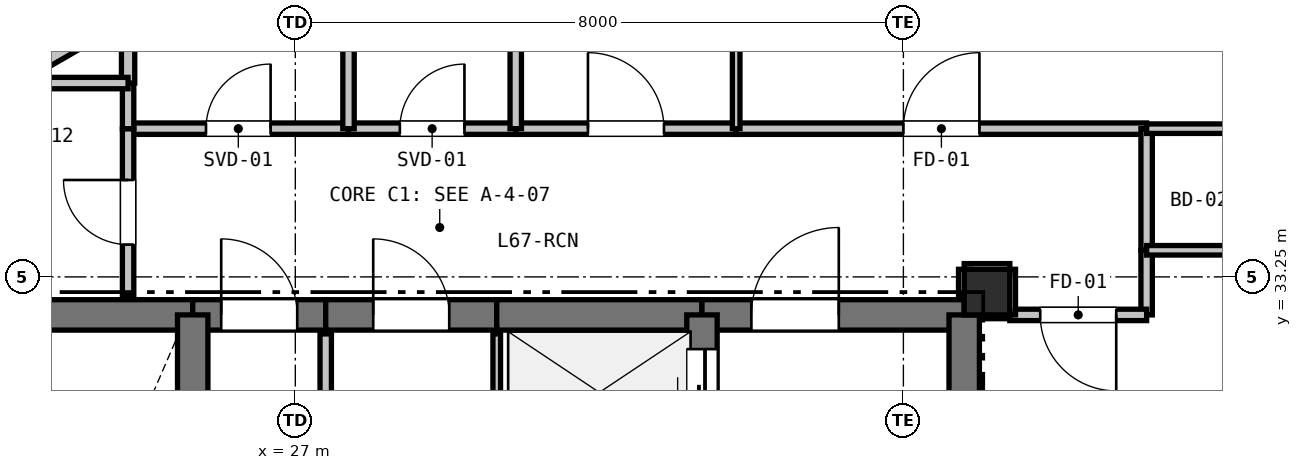
"""IFC4 building model, lengths in metres.
Left out: names, types, materials, properties, quantities, classifications, styles, units other than length and angle.
Written with IfcOpenShell. Run it as: python <this file> out.ifc"""

import sys

from ifc_helpers import new_model, si_unit, direction, frame, frame_2d, origin, origin_2d, place, context, subcontext, project, spatial, rectangle, extrude, element, fill, save


model = new_model("IFC4")
c1 = context("Model", 3, precision=1e-05, world=origin(), true_north=direction((0.0, 1.0)))
c2 = subcontext(c1, "Body", "Model", "MODEL_VIEW")
j1 = project(units=[si_unit("LENGTHUNIT", "METRE"), si_unit("PLANEANGLEUNIT", "RADIAN")], contexts=[c1])
p1 = place(None, origin())
s1 = spatial("IfcSite", under=j1, at=p1, CompositionType="ELEMENT")
p2 = place(p1, origin())
s2 = spatial("IfcBuilding", under=s1, at=p2, CompositionType="ELEMENT")
p3 = place(p2, frame((0.0, 0.0, 239.7)))
s3 = spatial("IfcBuildingStorey", under=s2, at=p3, CompositionType="ELEMENT", Elevation=239.7)
p4 = place(p3, frame((36.1, 33.05, 0.0), z_axis=(0.0, 0.0, 1.0), x_axis=(1.0, 0.0, 0.0)))
e1 = element("IfcColumn", 1, at=p4, inside=s3, PredefinedType="COLUMN", context=c2, shape_type="SweptSolid", body=[
    extrude(rectangle(XDim=0.6, YDim=0.6, at=origin_2d()), origin(), (0.0, 0.0, 1.0), 3.3),
])
p5 = place(p3, frame((20.066, 33.997, 0.0), z_axis=(0.0, 0.0, 1.0), x_axis=(0.866019557082, 0.500010126649, 0.0)))
e2 = element("IfcWall", 2, at=p5, inside=s3, PredefinedType="PARAPET", context=c2, shape_type="SweptSolid", body=[
    extrude(rectangle(XDim=8.228, YDim=0.2, at=frame_2d((4.114, 0.0))), origin(), (0.0, 0.0, 1.0), 0.2),
])
p6 = place(p3, frame((22.2, 32.75, 0.0), z_axis=(0.0, 0.0, 1.0), x_axis=(1.0, 0.0, 0.0)))
e3 = element("IfcWall", 3, at=p6, inside=s3, PredefinedType="SHEAR", context=c2, shape_type="SweptSolid", body=[
    extrude(rectangle(XDim=3.45, YDim=0.4, at=frame_2d((1.725, 0.0))), origin(), (0.0, 0.0, 1.0), 3.08),
])
p7 = place(p3, frame((25.65, 32.75, 0.0), z_axis=(0.0, 0.0, 1.0), x_axis=(1.0, 0.0, 0.0)))
e4 = element("IfcWall", 4, at=p7, inside=s3, PredefinedType="SHEAR", context=c2, shape_type="SweptSolid", body=[
    extrude(rectangle(XDim=1.75, YDim=0.4, at=frame_2d((0.875, 0.0))), origin(), (0.0, 0.0, 1.0), 3.08),
])
p8 = place(p7, frame((0.375, 0.0, 0.0)))
e5 = element("IfcOpeningElement", 5, at=p8, cuts=e4, PredefinedType="OPENING", context=c2, shape_type="SweptSolid", body=[
    extrude(rectangle(XDim=1.0, YDim=2.15, at=frame_2d((0.5, 1.075))), frame((0.0, 0.21, 0.0), z_axis=(0.0, -1.0, 0.0), x_axis=(1.0, 0.0, 0.0)), (0.0, 0.0, 1.0), 0.42),
])
p9 = place(p3, frame((27.4, 32.75, 0.0), z_axis=(0.0, 0.0, 1.0), x_axis=(1.0, 0.0, 0.0)))
e6 = element("IfcWall", 6, at=p9, inside=s3, PredefinedType="SHEAR", context=c2, shape_type="SweptSolid", body=[
    extrude(rectangle(XDim=2.25, YDim=0.4, at=frame_2d((1.125, 0.0))), origin(), (0.0, 0.0, 1.0), 3.08),
])
p10 = place(p9, frame((0.625, 0.0, 0.0)))
e7 = element("IfcOpeningElement", 7, at=p10, cuts=e6, PredefinedType="OPENING", context=c2, shape_type="SweptSolid", body=[
    extrude(rectangle(XDim=1.0, YDim=2.15, at=frame_2d((0.5, 1.075))), frame((0.0, 0.21, 0.0), z_axis=(0.0, -1.0, 0.0), x_axis=(1.0, 0.0, 0.0)), (0.0, 0.0, 1.0), 0.42),
])
p11 = place(p3, frame((29.65, 32.75, 0.0), z_axis=(0.0, 0.0, 1.0), x_axis=(1.0, 0.0, 0.0)))
e8 = element("IfcWall", 8, at=p11, inside=s3, PredefinedType="SHEAR", context=c2, shape_type="SweptSolid", body=[
    extrude(rectangle(XDim=2.7, YDim=0.4, at=frame_2d((1.35, 0.0))), origin(), (0.0, 0.0, 1.0), 3.08),
])
p12 = place(p3, frame((32.35, 32.75, 0.0), z_axis=(0.0, 0.0, 1.0), x_axis=(1.0, 0.0, 0.0)))
e9 = element("IfcWall", 9, at=p12, inside=s3, PredefinedType="SHEAR", context=c2, shape_type="SweptSolid", body=[
    extrude(rectangle(XDim=3.45, YDim=0.4, at=frame_2d((1.725, 0.0))), origin(), (0.0, 0.0, 1.0), 3.08),
])
p13 = place(p12, frame((0.65, 0.0, 0.0)))
e10 = element("IfcOpeningElement", 10, at=p13, cuts=e9, PredefinedType="OPENING", context=c2, shape_type="SweptSolid", body=[
    extrude(rectangle(XDim=1.15, YDim=2.15, at=frame_2d((0.575, 1.075))), frame((0.0, 0.21, 0.0), z_axis=(0.0, -1.0, 0.0), x_axis=(1.0, 0.0, 0.0)), (0.0, 0.0, 1.0), 0.42),
])
p14 = place(p3, frame((35.8, 32.75, 0.0), z_axis=(0.0, 0.0, 1.0), x_axis=(0.0, -1.0, 0.0)))
e11 = element("IfcWall", 11, at=p14, inside=s3, PredefinedType="SHEAR", context=c2, shape_type="SweptSolid", body=[
    extrude(rectangle(XDim=4.65, YDim=0.4, at=frame_2d((2.325, 0.0))), origin(), (0.0, 0.0, 1.0), 3.08),
])
p15 = place(p3, frame((25.65, 27.95, 0.0), z_axis=(0.0, 0.0, 1.0), x_axis=(0.0, 1.0, 0.0)))
e12 = element("IfcWall", 12, at=p15, inside=s3, PredefinedType="SHEAR", context=c2, shape_type="SweptSolid", body=[
    extrude(rectangle(XDim=4.8, YDim=0.4, at=frame_2d((2.4, 0.0))), origin(), (0.0, 0.0, 1.0), 3.08),
])
p16 = place(p3, frame((32.35, 30.75, 0.0), z_axis=(0.0, 0.0, 1.0), x_axis=(0.0, 1.0, 0.0)))
e13 = element("IfcWall", 13, at=p16, inside=s3, PredefinedType="SHEAR", context=c2, shape_type="SweptSolid", body=[
    extrude(rectangle(XDim=2.0, YDim=0.4, at=frame_2d((1.0, 0.0))), origin(), (0.0, 0.0, 1.0), 3.08),
])
p17 = place(p16, frame((0.45, 0.0, 0.0)))
e14 = element("IfcOpeningElement", 14, at=p17, cuts=e13, PredefinedType="OPENING", context=c2, shape_type="SweptSolid", body=[
    extrude(rectangle(XDim=1.1, YDim=2.15, at=frame_2d((0.55, 1.075))), frame((0.0, 0.21, 0.0), z_axis=(0.0, -1.0, 0.0), x_axis=(1.0, 0.0, 0.0)), (0.0, 0.0, 1.0), 0.42),
])
p18 = place(p3, frame((29.65, 30.3, 0.0), z_axis=(0.0, 0.0, 1.0), x_axis=(0.0, 1.0, 0.0)))
e15 = element("IfcWall", 15, at=p18, inside=s3, PredefinedType="PARTITIONING", context=c2, shape_type="SweptSolid", body=[
    extrude(rectangle(XDim=2.2, YDim=0.1, at=frame_2d((1.1, 0.0))), origin(), (0.0, 0.0, 1.0), 3.08),
])
p19 = place(p3, frame((27.4, 32.5, 0.0), z_axis=(0.0, 0.0, 1.0), x_axis=(0.0, -1.0, 0.0)))
e16 = element("IfcWall", 16, at=p19, inside=s3, PredefinedType="PARTITIONING", context=c2, shape_type="SweptSolid", body=[
    extrude(rectangle(XDim=4.55, YDim=0.15, at=frame_2d((2.275, 0.0))), origin(), (0.0, 0.0, 1.0), 3.08),
])
p20 = place(p19, frame((1.775, 0.0, 0.0)))
e17 = element("IfcOpeningElement", 17, at=p20, cuts=e16, PredefinedType="OPENING", context=c2, shape_type="SweptSolid", body=[
    extrude(rectangle(XDim=1.0, YDim=2.15, at=frame_2d((0.5, 1.075))), frame((0.0, 0.085, 0.0), z_axis=(0.0, -1.0, 0.0), x_axis=(1.0, 0.0, 0.0)), (0.0, 0.0, 1.0), 0.17),
])
p21 = place(p3, frame((24.8, 35.2, 0.0), z_axis=(0.0, 0.0, 1.0), x_axis=(1.0, 0.0, 0.0)))
e18 = element("IfcWall", 18, at=p21, inside=s3, PredefinedType="PARTITIONING", context=c2, shape_type="SweptSolid", body=[
    extrude(rectangle(XDim=2.9, YDim=0.15, at=frame_2d((1.45, 0.0))), origin(), (0.0, 0.0, 1.0), 3.08),
])
p22 = place(p21, frame((1.025, 0.0, 0.0)))
e19 = element("IfcOpeningElement", 19, at=p22, cuts=e18, PredefinedType="OPENING", context=c2, shape_type="SweptSolid", body=[
    extrude(rectangle(XDim=0.85, YDim=2.1, at=frame_2d((0.425, 1.05))), frame((0.0, 0.085, 0.0), z_axis=(0.0, -1.0, 0.0), x_axis=(1.0, 0.0, 0.0)), (0.0, 0.0, 1.0), 0.17),
])
p23 = place(p3, frame((27.7, 35.2, 0.0), z_axis=(0.0, 0.0, 1.0), x_axis=(1.0, 0.0, 0.0)))
e20 = element("IfcWall", 20, at=p23, inside=s3, PredefinedType="PARTITIONING", context=c2, shape_type="SweptSolid", body=[
    extrude(rectangle(XDim=2.2, YDim=0.15, at=frame_2d((1.1, 0.0))), origin(), (0.0, 0.0, 1.0), 3.08),
])
p24 = place(p23, frame((0.675, 0.0, 0.0)))
e21 = element("IfcOpeningElement", 21, at=p24, cuts=e20, PredefinedType="OPENING", context=c2, shape_type="SweptSolid", body=[
    extrude(rectangle(XDim=0.85, YDim=2.1, at=frame_2d((0.425, 1.05))), frame((0.0, 0.085, 0.0), z_axis=(0.0, -1.0, 0.0), x_axis=(1.0, 0.0, 0.0)), (0.0, 0.0, 1.0), 0.17),
])
p25 = place(p3, frame((29.9, 35.2, 0.0), z_axis=(0.0, 0.0, 1.0), x_axis=(1.0, 0.0, 0.0)))
e22 = element("IfcWall", 22, at=p25, inside=s3, PredefinedType="PARTITIONING", context=c2, shape_type="SweptSolid", body=[
    extrude(rectangle(XDim=2.9, YDim=0.15, at=frame_2d((1.45, 0.0))), origin(), (0.0, 0.0, 1.0), 3.08),
])
p26 = place(p25, frame((0.95, 0.0, 0.0)))
e23 = element("IfcOpeningElement", 23, at=p26, cuts=e22, PredefinedType="OPENING", context=c2, shape_type="SweptSolid", body=[
    extrude(rectangle(XDim=1.0, YDim=2.15, at=frame_2d((0.5, 1.075))), frame((0.0, 0.085, 0.0), z_axis=(0.0, -1.0, 0.0), x_axis=(1.0, 0.0, 0.0)), (0.0, 0.0, 1.0), 0.17),
])
p27 = place(p3, frame((32.8, 35.2, 0.0), z_axis=(0.0, 0.0, 1.0), x_axis=(1.0, 0.0, 0.0)))
e24 = element("IfcWall", 24, at=p27, inside=s3, PredefinedType="PARTITIONING", context=c2, shape_type="SweptSolid", body=[
    extrude(rectangle(XDim=5.4, YDim=0.15, at=frame_2d((2.7, 0.0))), origin(), (0.0, 0.0, 1.0), 2.528),
])
p28 = place(p27, frame((2.2, 0.0, 0.0)))
e25 = element("IfcOpeningElement", 25, at=p28, cuts=e24, PredefinedType="OPENING", context=c2, shape_type="SweptSolid", body=[
    extrude(rectangle(XDim=1.0, YDim=2.15, at=frame_2d((0.5, 1.075))), frame((0.0, 0.085, 0.0), z_axis=(0.0, -1.0, 0.0), x_axis=(1.0, 0.0, 0.0)), (0.0, 0.0, 1.0), 0.17),
])
p29 = place(p3, frame((38.2, 35.2, 0.0), z_axis=(0.0, 0.0, 1.0), x_axis=(0.0, -1.0, 0.0)))
e26 = element("IfcWall", 26, at=p29, inside=s3, PredefinedType="PARTITIONING", context=c2, shape_type="SweptSolid", body=[
    extrude(rectangle(XDim=1.6, YDim=0.15, at=frame_2d((0.8, 0.0))), origin(), (0.0, 0.0, 1.0), 3.08),
])
p30 = place(p3, frame((38.2, 33.6, 0.0), z_axis=(0.0, 0.0, 1.0), x_axis=(0.0, -1.0, 0.0)))
e27 = element("IfcWall", 27, at=p30, inside=s3, PredefinedType="PARTITIONING", context=c2, shape_type="SweptSolid", body=[
    extrude(rectangle(XDim=0.85, YDim=0.15, at=frame_2d((0.425, 0.0))), origin(), (0.0, 0.0, 1.0), 3.08),
])
p31 = place(p3, frame((38.2, 32.75, 0.0), z_axis=(0.0, 0.0, 1.0), x_axis=(-1.0, 0.0, 0.0)))
e28 = element("IfcWall", 28, at=p31, inside=s3, PredefinedType="PARTITIONING", context=c2, shape_type="SweptSolid", body=[
    extrude(rectangle(XDim=1.8, YDim=0.15, at=frame_2d((0.9, 0.0))), origin(), (0.0, 0.0, 1.0), 3.08),
])
p32 = place(p31, frame((0.4, 0.0, 0.0)))
e29 = element("IfcOpeningElement", 29, at=p32, cuts=e28, PredefinedType="OPENING", context=c2, shape_type="SweptSolid", body=[
    extrude(rectangle(XDim=1.0, YDim=2.15, at=frame_2d((0.5, 1.075))), frame((0.0, 0.085, 0.0), z_axis=(0.0, -1.0, 0.0), x_axis=(1.0, 0.0, 0.0)), (0.0, 0.0, 1.0), 0.17),
])
p33 = place(p3, frame((36.4, 32.75, 0.0), z_axis=(0.0, 0.0, 1.0), x_axis=(0.0, 1.0, 0.0)))
e30 = element("IfcWall", 30, at=p33, inside=s3, PredefinedType="PARTITIONING", context=c2, shape_type="SweptSolid", body=[
    extrude(rectangle(XDim=0.6, YDim=0.15, at=frame_2d((0.3, 0.0))), origin(), (0.0, 0.0, 1.0), 2.528),
])
p34 = place(p3, frame((36.4, 33.35, 0.0), z_axis=(0.0, 0.0, 1.0), x_axis=(-1.0, 0.0, 0.0)))
e31 = element("IfcWall", 31, at=p34, inside=s3, PredefinedType="PARTITIONING", context=c2, shape_type="SweptSolid", body=[
    extrude(rectangle(XDim=0.6, YDim=0.15, at=frame_2d((0.3, 0.0))), origin(), (0.0, 0.0, 1.0), 2.528),
])
p35 = place(p3, frame((35.8, 33.35, 0.0), z_axis=(0.0, 0.0, 1.0), x_axis=(0.0, -1.0, 0.0)))
e32 = element("IfcWall", 32, at=p35, inside=s3, PredefinedType="PARTITIONING", context=c2, shape_type="SweptSolid", body=[
    extrude(rectangle(XDim=0.35, YDim=0.15, at=frame_2d((0.175, 0.0))), origin(), (0.0, 0.0, 1.0), 2.605),
])
p36 = place(p3, frame((24.8, 33.0, 0.0), z_axis=(0.0, 0.0, 1.0), x_axis=(0.0, 1.0, 0.0)))
e33 = element("IfcWall", 33, at=p36, inside=s3, PredefinedType="PARTITIONING", context=c2, shape_type="SweptSolid", body=[
    extrude(rectangle(XDim=2.2, YDim=0.15, at=frame_2d((1.1, 0.0))), origin(), (0.0, 0.0, 1.0), 2.605),
])
p37 = place(p36, frame((0.675, 0.0, 0.0)))
e34 = element("IfcOpeningElement", 34, at=p37, cuts=e33, PredefinedType="OPENING", context=c2, shape_type="SweptSolid", body=[
    extrude(rectangle(XDim=0.85, YDim=2.1, at=frame_2d((0.425, 1.05))), frame((0.0, 0.085, 0.0), z_axis=(0.0, -1.0, 0.0), x_axis=(1.0, 0.0, 0.0)), (0.0, 0.0, 1.0), 0.17),
])
p38 = place(p3, frame((27.7, 38.053, 0.0), z_axis=(0.0, 0.0, 1.0), x_axis=(0.0, -1.0, 0.0)))
e35 = element("IfcWall", 35, at=p38, inside=s3, PredefinedType="PARTITIONING", context=c2, shape_type="SweptSolid", body=[
    extrude(rectangle(XDim=2.853, YDim=0.15, at=frame_2d((1.427, 0.0))), origin(), (0.0, 0.0, 1.0), 2.365),
])
p39 = place(p3, frame((24.8, 35.2, 0.0), z_axis=(0.0, 0.0, 1.0), x_axis=(0.0, 1.0, 0.0)))
e36 = element("IfcWall", 36, at=p39, inside=s3, PredefinedType="PARTITIONING", context=c2, shape_type="SweptSolid", body=[
    extrude(rectangle(XDim=0.6, YDim=0.15, at=frame_2d((0.3, 0.0))), origin(), (0.0, 0.0, 1.0), 3.08),
])
p40 = place(p3, frame((24.8, 35.8, 0.0), z_axis=(0.0, 0.0, 1.0), x_axis=(0.0, 1.0, 0.0)))
e37 = element("IfcWall", 37, at=p40, inside=s3, PredefinedType="PLUMBINGWALL", context=c2, shape_type="SweptSolid", body=[
    extrude(rectangle(XDim=0.884, YDim=0.175, at=frame_2d((0.442, 0.0))), origin(), (0.0, 0.0, 1.0), 2.365),
])
p41 = place(p3, frame((39.606, 35.2, 0.0), z_axis=(0.0, 0.0, 1.0), x_axis=(-1.0, 0.0, 0.0)))
e38 = element("IfcWall", 38, at=p41, inside=s3, PredefinedType="PARTITIONING", context=c2, shape_type="SweptSolid", body=[
    extrude(rectangle(XDim=1.406, YDim=0.125, at=frame_2d((0.703, 0.0))), origin(), (0.0, 0.0, 1.0), 2.365),
])
p42 = place(p3, frame((32.8, 35.2, 0.0), z_axis=(0.0, 0.0, 1.0), x_axis=(0.0, 1.0, 0.0)))
e39 = element("IfcWall", 39, at=p42, inside=s3, PredefinedType="PARTITIONING", context=c2, shape_type="SweptSolid", body=[
    extrude(rectangle(XDim=5.991, YDim=0.1, at=frame_2d((2.996, 0.0))), origin(), (0.0, 0.0, 1.0), 3.08),
])
p43 = place(p3, frame((36.05, 32.75, 0.0), z_axis=(0.0, 0.0, 1.0), x_axis=(1.0, 0.0, 0.0)))
e40 = element("IfcWall", 40, at=p43, inside=s3, PredefinedType="PARTITIONING", context=c2, shape_type="SweptSolid", body=[
    extrude(rectangle(XDim=0.35, YDim=0.1, at=frame_2d((0.175, 0.0))), origin(), (0.0, 0.0, 1.0), 2.605),
])
p44 = place(p3, frame((38.2, 33.6, 0.0), z_axis=(0.0, 0.0, 1.0), x_axis=(1.0, 0.0, 0.0)))
e41 = element("IfcWall", 41, at=p44, inside=s3, PredefinedType="PARTITIONING", context=c2, shape_type="SweptSolid", body=[
    extrude(rectangle(XDim=1.406, YDim=0.125, at=frame_2d((0.703, 0.0))), origin(), (0.0, 0.0, 1.0), 2.365),
])
p45 = place(p3, frame((29.9, 37.5, 0.0), z_axis=(0.0, 0.0, 1.0), x_axis=(0.0, -1.0, 0.0)))
e42 = element("IfcWall", 42, at=p45, inside=s3, PredefinedType="PARTITIONING", context=c2, shape_type="SweptSolid", body=[
    extrude(rectangle(XDim=2.3, YDim=0.15, at=frame_2d((1.15, 0.0))), origin(), (0.0, 0.0, 1.0), 3.08),
])
p46 = place(p3, frame((23.262, 35.8, 0.0), z_axis=(0.0, 0.0, 1.0), x_axis=(1.0, 0.0, 0.0)))
e43 = element("IfcWall", 43, at=p46, inside=s3, PredefinedType="PARTITIONING", context=c2, shape_type="SweptSolid", body=[
    extrude(rectangle(XDim=1.538, YDim=0.15, at=frame_2d((0.769, 0.0))), origin(), (0.0, 0.0, 1.0), 2.365),
])
p47 = place(p8, origin())
e44 = element("IfcDoor", 44, at=p47, inside=s3, OperationType="SINGLE_SWING_LEFT", PredefinedType="DOOR", context=c2, shape_type="SweptSolid", body=[
    extrude(rectangle(XDim=1.0, YDim=2.15, at=frame_2d((0.5, 1.075))), frame((0.0, 0.025, 0.0), z_axis=(0.0, -1.0, 0.0), x_axis=(1.0, 0.0, 0.0)), (0.0, 0.0, 1.0), 0.05),
])
fill(e5, e44)
p48 = place(p17, origin())
e45 = element("IfcDoor", 45, at=p48, inside=s3, OperationType="SLIDING_TO_LEFT", PredefinedType="DOOR", context=c2, shape_type="SweptSolid", body=[
    extrude(rectangle(XDim=1.1, YDim=2.15, at=frame_2d((0.55, 1.075))), frame((0.0, 0.025, 0.0), z_axis=(0.0, -1.0, 0.0), x_axis=(1.0, 0.0, 0.0)), (0.0, 0.0, 1.0), 0.05),
])
fill(e14, e45)
p49 = place(p13, origin())
e46 = element("IfcDoor", 46, at=p49, inside=s3, OperationType="SINGLE_SWING_RIGHT", PredefinedType="DOOR", context=c2, shape_type="SweptSolid", body=[
    extrude(rectangle(XDim=1.15, YDim=2.15, at=frame_2d((0.575, 1.075))), frame((0.0, 0.025, 0.0), z_axis=(0.0, -1.0, 0.0), x_axis=(1.0, 0.0, 0.0)), (0.0, 0.0, 1.0), 0.05),
])
fill(e10, e46)
p50 = place(p22, origin())
e47 = element("IfcDoor", 47, at=p50, inside=s3, OperationType="SINGLE_SWING_RIGHT", PredefinedType="DOOR", context=c2, shape_type="SweptSolid", body=[
    extrude(rectangle(XDim=0.85, YDim=2.1, at=frame_2d((0.425, 1.05))), frame((0.0, 0.025, 0.0), z_axis=(0.0, -1.0, 0.0), x_axis=(1.0, 0.0, 0.0)), (0.0, 0.0, 1.0), 0.05),
])
fill(e19, e47)
p51 = place(p10, origin())
e48 = element("IfcDoor", 48, at=p51, inside=s3, OperationType="SINGLE_SWING_LEFT", PredefinedType="DOOR", context=c2, shape_type="SweptSolid", body=[
    extrude(rectangle(XDim=1.0, YDim=2.15, at=frame_2d((0.5, 1.075))), frame((0.0, 0.025, 0.0), z_axis=(0.0, -1.0, 0.0), x_axis=(1.0, 0.0, 0.0)), (0.0, 0.0, 1.0), 0.05),
])
fill(e7, e48)
p52 = place(p28, origin())
e49 = element("IfcDoor", 49, at=p52, inside=s3, OperationType="SINGLE_SWING_RIGHT", PredefinedType="DOOR", context=c2, shape_type="SweptSolid", body=[
    extrude(rectangle(XDim=1.0, YDim=2.15, at=frame_2d((0.5, 1.075))), frame((0.0, 0.025, 0.0), z_axis=(0.0, -1.0, 0.0), x_axis=(1.0, 0.0, 0.0)), (0.0, 0.0, 1.0), 0.05),
])
fill(e25, e49)
p53 = place(p32, origin())
e50 = element("IfcDoor", 50, at=p53, inside=s3, OperationType="SINGLE_SWING_LEFT", PredefinedType="DOOR", context=c2, shape_type="SweptSolid", body=[
    extrude(rectangle(XDim=1.0, YDim=2.15, at=frame_2d((0.5, 1.075))), frame((0.0, 0.025, 0.0), z_axis=(0.0, -1.0, 0.0), x_axis=(1.0, 0.0, 0.0)), (0.0, 0.0, 1.0), 0.05),
])
fill(e29, e50)
p54 = place(p24, origin())
e51 = element("IfcDoor", 51, at=p54, inside=s3, OperationType="SINGLE_SWING_RIGHT", PredefinedType="DOOR", context=c2, shape_type="SweptSolid", body=[
    extrude(rectangle(XDim=0.85, YDim=2.1, at=frame_2d((0.425, 1.05))), frame((0.0, 0.025, 0.0), z_axis=(0.0, -1.0, 0.0), x_axis=(1.0, 0.0, 0.0)), (0.0, 0.0, 1.0), 0.05),
])
fill(e21, e51)
p55 = place(p26, origin())
e52 = element("IfcDoor", 52, at=p55, inside=s3, OperationType="SINGLE_SWING_LEFT", PredefinedType="DOOR", context=c2, shape_type="SweptSolid", body=[
    extrude(rectangle(XDim=1.0, YDim=2.15, at=frame_2d((0.5, 1.075))), frame((0.0, 0.025, 0.0), z_axis=(0.0, -1.0, 0.0), x_axis=(1.0, 0.0, 0.0)), (0.0, 0.0, 1.0), 0.05),
])
fill(e23, e52)
p56 = place(p37, origin())
e53 = element("IfcDoor", 53, at=p56, inside=s3, OperationType="SINGLE_SWING_RIGHT", PredefinedType="DOOR", context=c2, shape_type="SweptSolid", body=[
    extrude(rectangle(XDim=0.85, YDim=2.1, at=frame_2d((0.425, 1.05))), frame((0.0, 0.025, 0.0), z_axis=(0.0, -1.0, 0.0), x_axis=(1.0, 0.0, 0.0)), (0.0, 0.0, 1.0), 0.05),
])
fill(e34, e53)
save(model, sys.argv[1])
